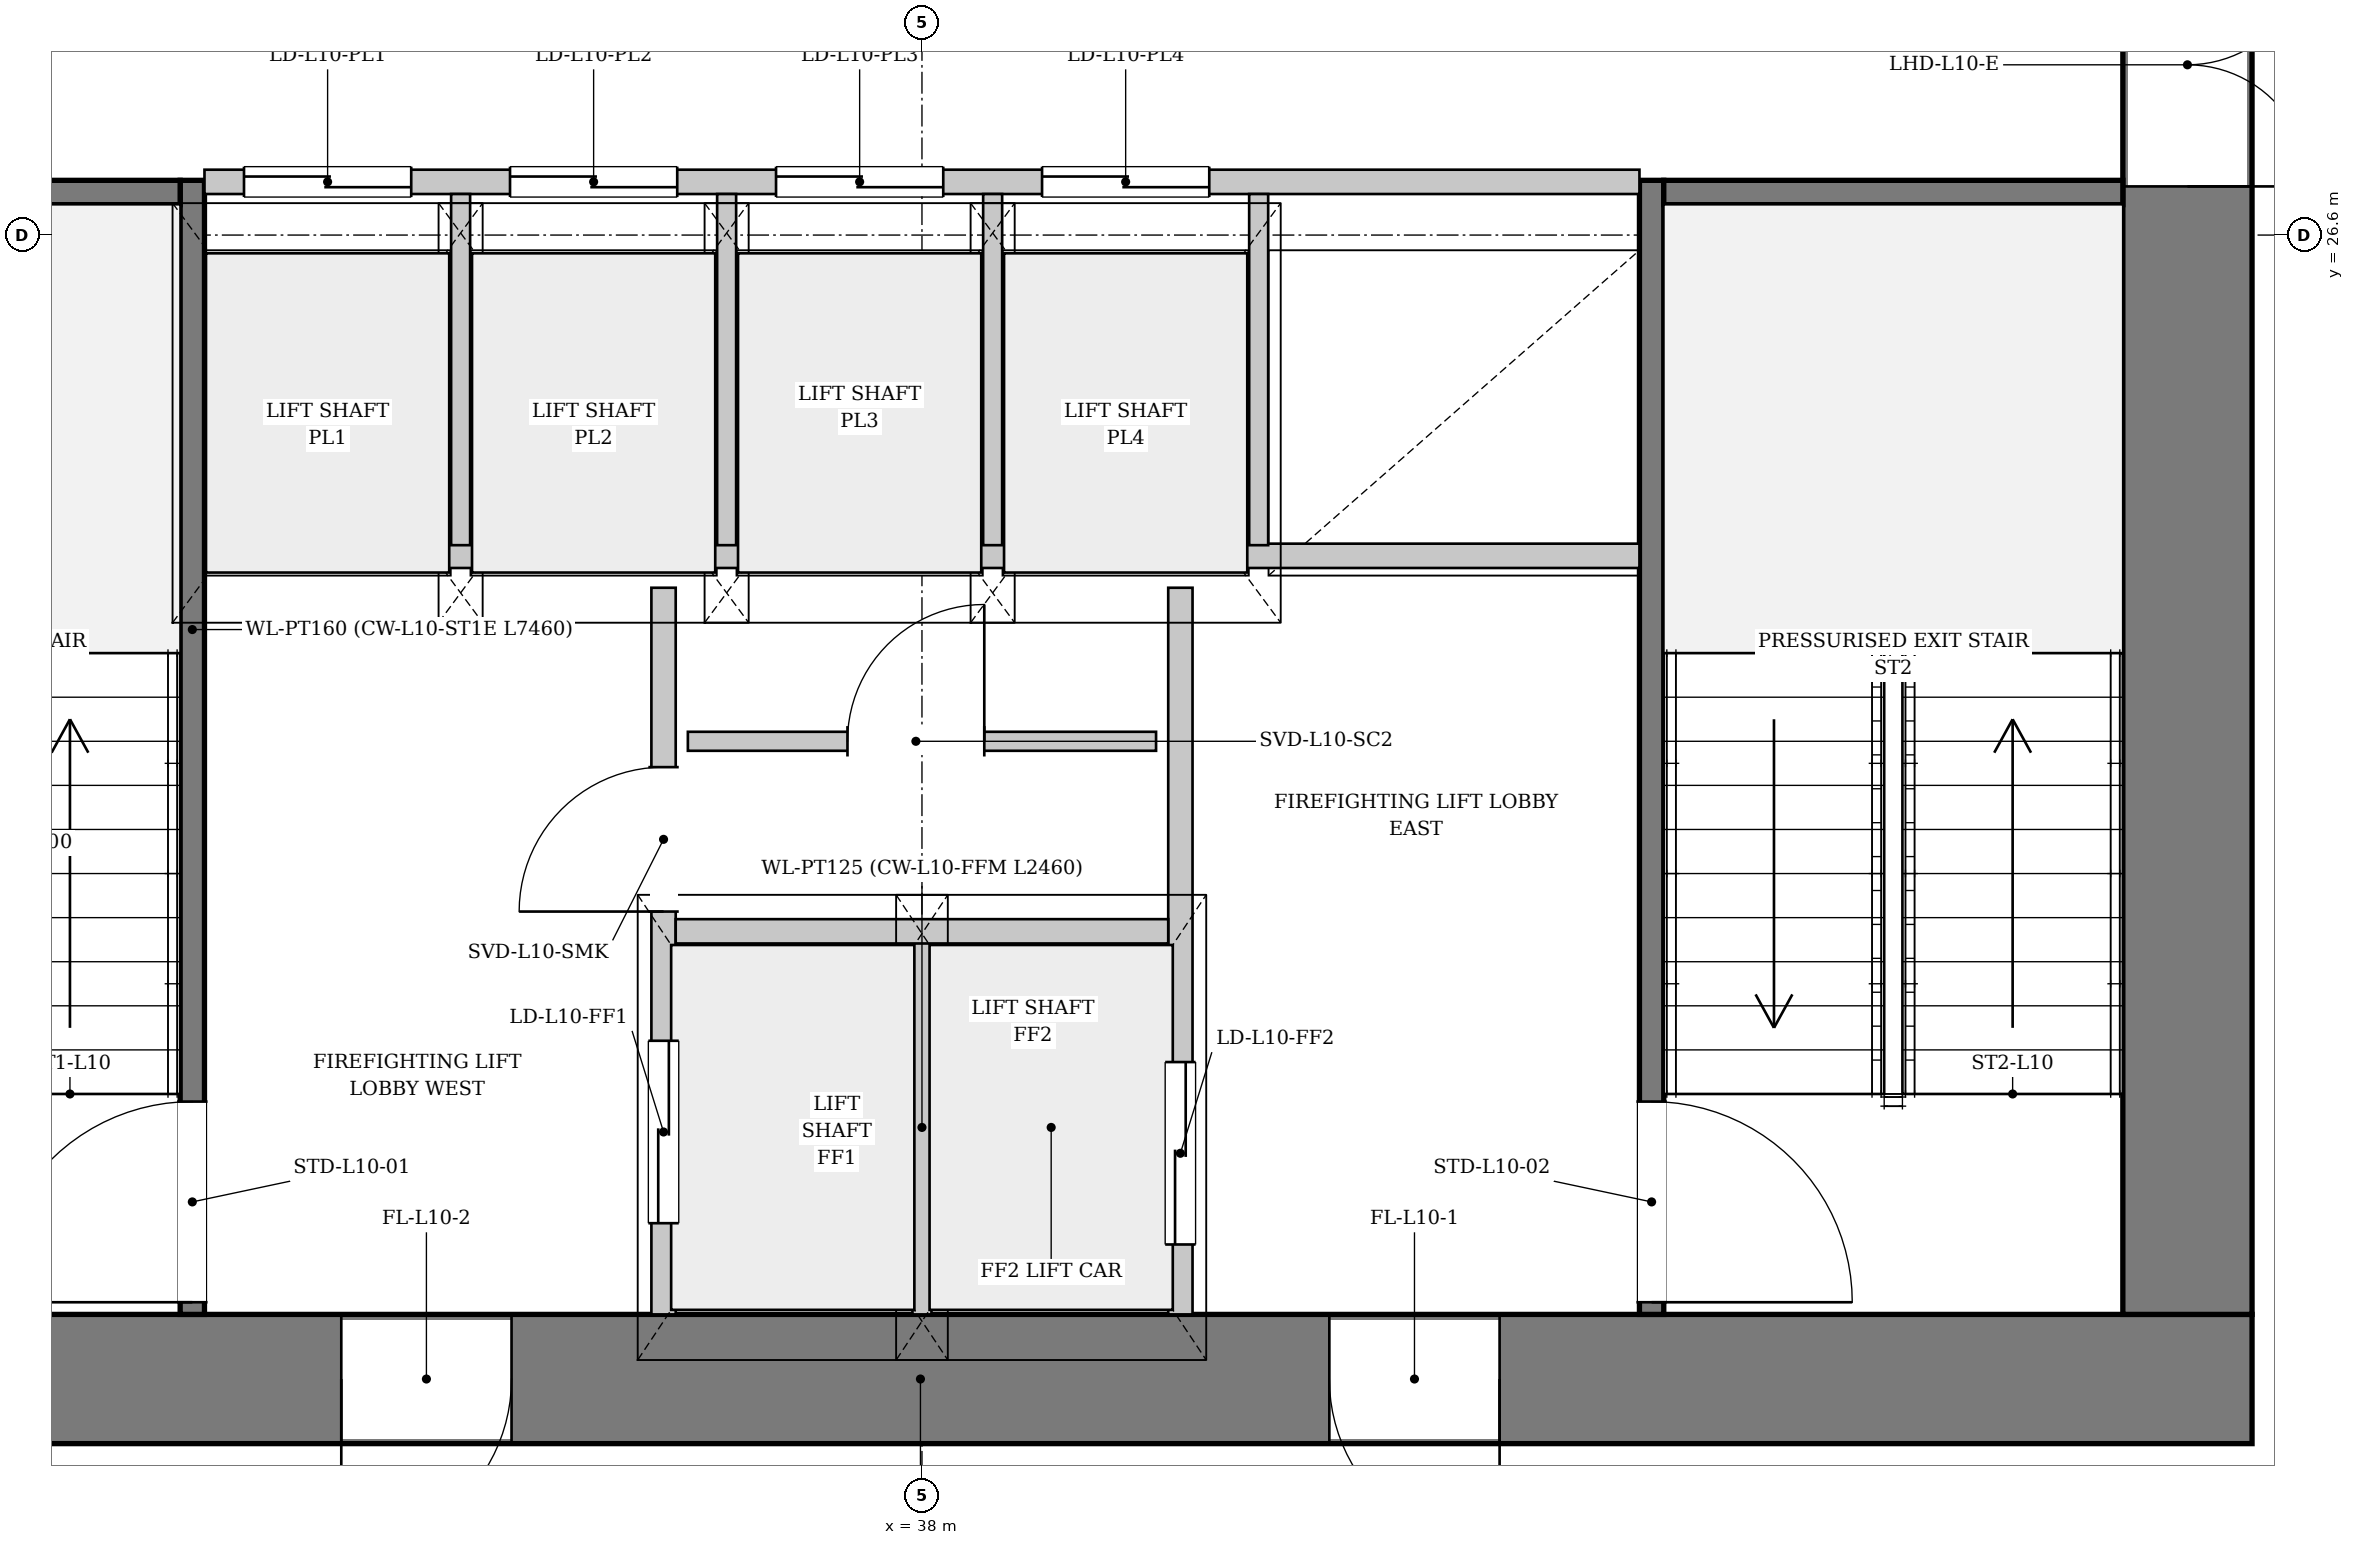
"""IFC4 building model, lengths in metres.
Left out: names, types, materials, properties, quantities, classifications, styles, units other than length and angle.
Written with IfcOpenShell. Run it as: python <this file> out.ifc"""

import sys

from ifc_helpers import new_model, si_unit, direction, frame, frame_2d, origin, place, context, subcontext, project, spatial, rectangle, extrude, source, transform, mapped, element, fill, save


model = new_model("IFC4")
c1 = context("Model", 3, precision=1e-05, world=origin(), true_north=direction((0.0, 1.0)))
c2 = subcontext(c1, "Body", "Model", "MODEL_VIEW")
j1 = project(units=[si_unit("LENGTHUNIT", "METRE"), si_unit("PLANEANGLEUNIT", "RADIAN")], contexts=[c1])
p1 = place(None, origin())
s1 = spatial("IfcSite", under=j1, at=p1, CompositionType="ELEMENT")
p2 = place(p1, origin())
s2 = spatial("IfcBuilding", under=s1, at=p2, CompositionType="ELEMENT")
p3 = place(p2, frame((0.0, 0.0, 43.5)))
s3 = spatial("IfcBuildingStorey", under=s2, at=p3, CompositionType="ELEMENT", Elevation=43.5)
p4 = place(p3, frame((46.75, 19.075, 0.0), z_axis=(0.0, 0.0, 1.0), x_axis=(-1.0, 0.0, 0.0)))
e1 = element("IfcWall", 1, at=p4, inside=s3, PredefinedType="SHEAR", context=c2, shape_type="SweptSolid", body=[
    extrude(rectangle(XDim=17.5, YDim=0.85, at=frame_2d((8.75, 0.0))), origin(), (0.0, 0.0, 1.0), 3.3),
])
p5 = place(p4, frame((4.95, 0.0, 0.0)))
e2 = element("IfcOpeningElement", 2, at=p5, cuts=e1, PredefinedType="OPENING", context=c2, shape_type="SweptSolid", body=[
    extrude(rectangle(XDim=1.12, YDim=2.25, at=frame_2d((0.56, 1.125))), frame((0.0, 0.435, 0.0), z_axis=(0.0, -1.0, 0.0), x_axis=(1.0, 0.0, 0.0)), (0.0, 0.0, 1.0), 0.87),
])
p6 = place(p4, frame((11.45, 0.0, 0.0)))
e3 = element("IfcOpeningElement", 3, at=p6, cuts=e1, PredefinedType="OPENING", context=c2, shape_type="SweptSolid", body=[
    extrude(rectangle(XDim=1.12, YDim=2.25, at=frame_2d((0.56, 1.125))), frame((0.0, 0.435, 0.0), z_axis=(0.0, -1.0, 0.0), x_axis=(1.0, 0.0, 0.0)), (0.0, 0.0, 1.0), 0.87),
])
p7 = place(p3, frame((46.325, 33.7, 0.0), z_axis=(0.0, 0.0, 1.0), x_axis=(0.0, -1.0, 0.0)))
e4 = element("IfcWall", 4, at=p7, inside=s3, PredefinedType="SHEAR", context=c2, shape_type="SweptSolid", body=[
    extrude(rectangle(XDim=14.2, YDim=0.85, at=frame_2d((7.1, 0.0))), origin(), (0.0, 0.0, 1.0), 3.3),
])
p8 = place(p7, frame((5.18, 0.0, 0.0)))
e5 = element("IfcOpeningElement", 5, at=p8, cuts=e4, PredefinedType="OPENING", context=c2, shape_type="SweptSolid", body=[
    extrude(rectangle(XDim=1.6, YDim=2.2, at=frame_2d((0.8, 1.1))), frame((0.0, 0.435, 0.0), z_axis=(0.0, -1.0, 0.0), x_axis=(1.0, 0.0, 0.0)), (0.0, 0.0, 1.0), 0.87),
])
p9 = place(p3, frame((33.2, 19.5, 0.0), z_axis=(0.0, 0.0, 1.0), x_axis=(0.0, 1.0, 0.0)))
e6 = element("IfcWall", 6, at=p9, inside=s3, PredefinedType="PARTITIONING", context=c2, shape_type="SweptSolid", body=[
    extrude(rectangle(XDim=7.46, YDim=0.16, at=frame_2d((3.73, 0.0))), origin(), (0.0, 0.0, 1.0), 3.3),
])
p10 = place(p9, frame((0.08, 0.0, 0.0)))
e7 = element("IfcOpeningElement", 7, at=p10, cuts=e6, PredefinedType="OPENING", context=c2, shape_type="SweptSolid", body=[
    extrude(rectangle(XDim=1.32, YDim=2.2, at=frame_2d((0.66, 1.1))), frame((0.0, 0.09, 0.0), z_axis=(0.0, -1.0, 0.0), x_axis=(1.0, 0.0, 0.0)), (0.0, 0.0, 1.0), 0.18),
])
p11 = place(p3, frame((30.1, 26.88, 0.0), z_axis=(0.0, 0.0, 1.0), x_axis=(1.0, 0.0, 0.0)))
e8 = element("IfcWall", 8, at=p11, inside=s3, PredefinedType="PARTITIONING", context=c2, shape_type="SweptSolid", body=[
    extrude(rectangle(XDim=3.02, YDim=0.16, at=frame_2d((1.51, 0.0))), origin(), (0.0, 0.0, 1.0), 3.3),
])
p12 = place(p3, frame((42.8, 26.96, 0.0), z_axis=(0.0, 0.0, 1.0), x_axis=(0.0, -1.0, 0.0)))
e9 = element("IfcWall", 9, at=p12, inside=s3, PredefinedType="PARTITIONING", context=c2, shape_type="SweptSolid", body=[
    extrude(rectangle(XDim=7.46, YDim=0.16, at=frame_2d((3.73, 0.0))), origin(), (0.0, 0.0, 1.0), 3.3),
])
p13 = place(p12, frame((6.06, 0.0, 0.0)))
e10 = element("IfcOpeningElement", 10, at=p13, cuts=e9, PredefinedType="OPENING", context=c2, shape_type="SweptSolid", body=[
    extrude(rectangle(XDim=1.32, YDim=2.2, at=frame_2d((0.66, 1.1))), frame((0.0, 0.09, 0.0), z_axis=(0.0, -1.0, 0.0), x_axis=(1.0, 0.0, 0.0)), (0.0, 0.0, 1.0), 0.18),
])
p14 = place(p3, frame((42.88, 26.88, 0.0), z_axis=(0.0, 0.0, 1.0), x_axis=(1.0, 0.0, 0.0)))
e11 = element("IfcWall", 11, at=p14, inside=s3, PredefinedType="PARTITIONING", context=c2, shape_type="SweptSolid", body=[
    extrude(rectangle(XDim=3.02, YDim=0.16, at=frame_2d((1.51, 0.0))), origin(), (0.0, 0.0, 1.0), 3.3),
])
p15 = place(p3, frame((36.3, 19.5, 0.0), z_axis=(0.0, 0.0, 1.0), x_axis=(0.0, 1.0, 0.0)))
e12 = element("IfcWall", 12, at=p15, inside=s3, PredefinedType="PARTITIONING", context=c2, shape_type="SweptSolid", body=[
    extrude(rectangle(XDim=4.78, YDim=0.16, at=frame_2d((2.39, 0.0))), origin(), (0.0, 0.0, 1.0), 3.3),
])
p16 = place(p15, frame((0.6, 0.0, 0.0)))
e13 = element("IfcOpeningElement", 13, at=p16, cuts=e12, PredefinedType="OPENING", context=c2, shape_type="SweptSolid", body=[
    extrude(rectangle(XDim=1.2, YDim=2.2, at=frame_2d((0.6, 1.1))), frame((0.0, 0.09, 0.0), z_axis=(0.0, -1.0, 0.0), x_axis=(1.0, 0.0, 0.0)), (0.0, 0.0, 1.0), 0.18),
])
p17 = place(p15, frame((2.65, 0.0, 0.0)))
e14 = element("IfcOpeningElement", 14, at=p17, cuts=e12, PredefinedType="OPENING", context=c2, shape_type="SweptSolid", body=[
    extrude(rectangle(XDim=0.95, YDim=2.1, at=frame_2d((0.475, 1.05))), frame((0.0, 0.09, 0.0), z_axis=(0.0, -1.0, 0.0), x_axis=(1.0, 0.0, 0.0)), (0.0, 0.0, 1.0), 0.18),
])
p18 = place(p3, frame((39.7, 24.28, 0.0), z_axis=(0.0, 0.0, 1.0), x_axis=(0.0, -1.0, 0.0)))
e15 = element("IfcWall", 15, at=p18, inside=s3, PredefinedType="PARTITIONING", context=c2, shape_type="SweptSolid", body=[
    extrude(rectangle(XDim=4.78, YDim=0.16, at=frame_2d((2.39, 0.0))), origin(), (0.0, 0.0, 1.0), 3.3),
])
p19 = place(p18, frame((3.12, 0.0, 0.0)))
e16 = element("IfcOpeningElement", 16, at=p19, cuts=e15, PredefinedType="OPENING", context=c2, shape_type="SweptSolid", body=[
    extrude(rectangle(XDim=1.2, YDim=2.2, at=frame_2d((0.6, 1.1))), frame((0.0, 0.09, 0.0), z_axis=(0.0, -1.0, 0.0), x_axis=(1.0, 0.0, 0.0)), (0.0, 0.0, 1.0), 0.18),
])
p20 = place(p3, frame((38.0, 19.5, 0.0), z_axis=(0.0, 0.0, 1.0), x_axis=(0.0, 1.0, 0.0)))
e17 = element("IfcWall", 17, at=p20, inside=s3, PredefinedType="PARTITIONING", context=c2, shape_type="SweptSolid", body=[
    extrude(rectangle(XDim=2.46, YDim=0.125, at=frame_2d((1.23, 0.0))), origin(), (0.0, 0.0, 1.0), 3.3),
])
p21 = place(p3, frame((36.38, 22.02, 0.0), z_axis=(0.0, 0.0, 1.0), x_axis=(1.0, 0.0, 0.0)))
e18 = element("IfcWall", 18, at=p21, inside=s3, PredefinedType="PARTITIONING", context=c2, shape_type="SweptSolid", body=[
    extrude(rectangle(XDim=3.24, YDim=0.16, at=frame_2d((1.62, 0.0))), origin(), (0.0, 0.0, 1.0), 3.3),
])
p22 = place(p3, frame((33.28, 24.49, 0.0), z_axis=(0.0, 0.0, 1.0), x_axis=(1.0, 0.0, 0.0)))
e19 = element("IfcWall", 19, at=p22, inside=s3, PredefinedType="PARTITIONING", context=c2, shape_type="SweptSolid", body=[
    extrude(rectangle(XDim=9.44, YDim=0.16, at=frame_2d((4.72, 0.0))), origin(), (0.0, 0.0, 1.0), 3.3),
])
p23 = place(p3, frame((36.46, 23.27, 0.0), z_axis=(0.0, 0.0, 1.0), x_axis=(1.0, 0.0, 0.0)))
e20 = element("IfcWall", 20, at=p23, inside=s3, PredefinedType="PARTITIONING", context=c2, shape_type="SweptSolid", body=[
    extrude(rectangle(XDim=3.08, YDim=0.125, at=frame_2d((1.54, 0.0))), origin(), (0.0, 0.0, 1.0), 3.3),
])
p24 = place(p23, frame((1.05, 0.0, 0.0)))
e21 = element("IfcOpeningElement", 21, at=p24, cuts=e20, PredefinedType="OPENING", context=c2, shape_type="SweptSolid", body=[
    extrude(rectangle(XDim=0.9, YDim=2.1, at=frame_2d((0.45, 1.05))), frame((0.0, 0.073, 0.0), z_axis=(0.0, -1.0, 0.0), x_axis=(1.0, 0.0, 0.0)), (0.0, 0.0, 1.0), 0.145),
])
p25 = place(p3, frame((33.28, 26.95, 0.0), z_axis=(0.0, 0.0, 1.0), x_axis=(1.0, 0.0, 0.0)))
e22 = element("IfcWall", 22, at=p25, inside=s3, PredefinedType="PARTITIONING", context=c2, shape_type="SweptSolid", body=[
    extrude(rectangle(XDim=9.44, YDim=0.16, at=frame_2d((4.72, 0.0))), origin(), (0.0, 0.0, 1.0), 3.3),
])
p26 = place(p25, frame((0.26, 0.0, 0.0)))
e23 = element("IfcOpeningElement", 23, at=p26, cuts=e22, PredefinedType="OPENING", context=c2, shape_type="SweptSolid", body=[
    extrude(rectangle(XDim=1.1, YDim=2.2, at=frame_2d((0.55, 1.1))), frame((0.0, 0.09, 0.0), z_axis=(0.0, -1.0, 0.0), x_axis=(1.0, 0.0, 0.0)), (0.0, 0.0, 1.0), 0.18),
])
p27 = place(p25, frame((2.01, 0.0, 0.0)))
e24 = element("IfcOpeningElement", 24, at=p27, cuts=e22, PredefinedType="OPENING", context=c2, shape_type="SweptSolid", body=[
    extrude(rectangle(XDim=1.1, YDim=2.2, at=frame_2d((0.55, 1.1))), frame((0.0, 0.09, 0.0), z_axis=(0.0, -1.0, 0.0), x_axis=(1.0, 0.0, 0.0)), (0.0, 0.0, 1.0), 0.18),
])
p28 = place(p25, frame((3.76, 0.0, 0.0)))
e25 = element("IfcOpeningElement", 25, at=p28, cuts=e22, PredefinedType="OPENING", context=c2, shape_type="SweptSolid", body=[
    extrude(rectangle(XDim=1.1, YDim=2.2, at=frame_2d((0.55, 1.1))), frame((0.0, 0.09, 0.0), z_axis=(0.0, -1.0, 0.0), x_axis=(1.0, 0.0, 0.0)), (0.0, 0.0, 1.0), 0.18),
])
p29 = place(p25, frame((5.51, 0.0, 0.0)))
e26 = element("IfcOpeningElement", 26, at=p29, cuts=e22, PredefinedType="OPENING", context=c2, shape_type="SweptSolid", body=[
    extrude(rectangle(XDim=1.1, YDim=2.2, at=frame_2d((0.55, 1.1))), frame((0.0, 0.09, 0.0), z_axis=(0.0, -1.0, 0.0), x_axis=(1.0, 0.0, 0.0)), (0.0, 0.0, 1.0), 0.18),
])
for number, where, z_axis, x_axis in (
    (27, (34.965, 24.56, 0.0), (0.0, 0.0, 1.0), (0.0, 1.0, 0.0)),
    (28, (36.715, 24.56, 0.0), (0.0, 0.0, 1.0), (0.0, 1.0, 0.0)),
    (29, (38.465, 24.56, 0.0), (0.0, 0.0, 1.0), (0.0, 1.0, 0.0)),
    (30, (40.215, 24.56, 0.0), (0.0, 0.0, 1.0), (0.0, 1.0, 0.0)),
):
    element("IfcWall", number, at=place(p3, frame(where, z_axis=z_axis, x_axis=x_axis)), inside=s3, PredefinedType="PARTITIONING", context=c2, shape_type="SweptSolid", body=[
        extrude(rectangle(XDim=2.31, YDim=0.125, at=frame_2d((1.155, 0.0))), origin(), (0.0, 0.0, 1.0), 3.3),
    ])
m1 = source(origin(), c2, "Body", "SweptSolid", [
    extrude(rectangle(XDim=1.12, YDim=2.25, at=frame_2d((0.56, 1.125))), frame((0.0, 0.025, 0.0), z_axis=(0.0, -1.0, 0.0), x_axis=(1.0, 0.0, 0.0)), (0.0, 0.0, 1.0), 0.05),
])
p30 = place(p5, origin())
e31 = element("IfcDoor", 31, at=p30, inside=s3, OperationType="SINGLE_SWING_LEFT", PredefinedType="DOOR", context=c2, shape_type="MappedRepresentation", body=[
    mapped(m1, transform((0.0, 0.0, 0.0), x_axis=(1.0, 0.0, 0.0), y_axis=(0.0, 1.0, 0.0), z_axis=(0.0, 0.0, 1.0), scale=1.0)),
])
fill(e2, e31)
p31 = place(p6, origin())
e32 = element("IfcDoor", 32, at=p31, inside=s3, OperationType="SINGLE_SWING_RIGHT", PredefinedType="DOOR", context=c2, shape_type="MappedRepresentation", body=[
    mapped(m1, transform((0.0, 0.0, 0.0), x_axis=(1.0, 0.0, 0.0), y_axis=(0.0, 1.0, 0.0), z_axis=(0.0, 0.0, 1.0), scale=1.0)),
])
fill(e3, e32)
m2 = source(origin(), c2, "Body", "SweptSolid", [
    extrude(rectangle(XDim=1.6, YDim=2.2, at=frame_2d((0.8, 1.1))), frame((0.0, 0.025, 0.0), z_axis=(0.0, -1.0, 0.0), x_axis=(1.0, 0.0, 0.0)), (0.0, 0.0, 1.0), 0.05),
])
p32 = place(p8, origin())
e33 = element("IfcDoor", 33, at=p32, inside=s3, OperationType="DOUBLE_DOOR_SINGLE_SWING", PredefinedType="DOOR", context=c2, shape_type="MappedRepresentation", body=[
    mapped(m2, transform((0.0, 0.0, 0.0), x_axis=(1.0, 0.0, 0.0), y_axis=(0.0, 1.0, 0.0), z_axis=(0.0, 0.0, 1.0), scale=1.0)),
])
fill(e5, e33)
m3 = source(origin(), c2, "Body", "SweptSolid", [
    extrude(rectangle(XDim=1.32, YDim=2.2, at=frame_2d((0.66, 1.1))), frame((0.0, 0.025, 0.0), z_axis=(0.0, -1.0, 0.0), x_axis=(1.0, 0.0, 0.0)), (0.0, 0.0, 1.0), 0.05),
])
p33 = place(p10, origin())
e34 = element("IfcDoor", 34, at=p33, inside=s3, OperationType="SINGLE_SWING_LEFT", PredefinedType="DOOR", context=c2, shape_type="MappedRepresentation", body=[
    mapped(m3, transform((0.0, 0.0, 0.0), x_axis=(1.0, 0.0, 0.0), y_axis=(0.0, 1.0, 0.0), z_axis=(0.0, 0.0, 1.0), scale=1.0)),
])
fill(e7, e34)
p34 = place(p13, origin())
e35 = element("IfcDoor", 35, at=p34, inside=s3, OperationType="SINGLE_SWING_RIGHT", PredefinedType="DOOR", context=c2, shape_type="MappedRepresentation", body=[
    mapped(m3, transform((0.0, 0.0, 0.0), x_axis=(1.0, 0.0, 0.0), y_axis=(0.0, 1.0, 0.0), z_axis=(0.0, 0.0, 1.0), scale=1.0)),
])
fill(e10, e35)
m4 = source(origin(), c2, "Body", "SweptSolid", [
    extrude(rectangle(XDim=1.2, YDim=2.2, at=frame_2d((0.6, 1.1))), frame((0.0, 0.025, 0.0), z_axis=(0.0, -1.0, 0.0), x_axis=(1.0, 0.0, 0.0)), (0.0, 0.0, 1.0), 0.05),
])
p35 = place(p16, origin())
e36 = element("IfcDoor", 36, at=p35, inside=s3, OperationType="DOUBLE_DOOR_SLIDING", PredefinedType="DOOR", context=c2, shape_type="MappedRepresentation", body=[
    mapped(m4, transform((0.0, 0.0, 0.0), x_axis=(1.0, 0.0, 0.0), y_axis=(0.0, 1.0, 0.0), z_axis=(0.0, 0.0, 1.0), scale=1.0)),
])
fill(e13, e36)
m5 = source(origin(), c2, "Body", "SweptSolid", [
    extrude(rectangle(XDim=0.95, YDim=2.1, at=frame_2d((0.475, 1.05))), frame((0.0, 0.025, 0.0), z_axis=(0.0, -1.0, 0.0), x_axis=(1.0, 0.0, 0.0)), (0.0, 0.0, 1.0), 0.05),
])
p36 = place(p17, origin())
e37 = element("IfcDoor", 37, at=p36, inside=s3, OperationType="SINGLE_SWING_LEFT", PredefinedType="DOOR", context=c2, shape_type="MappedRepresentation", body=[
    mapped(m5, transform((0.0, 0.0, 0.0), x_axis=(1.0, 0.0, 0.0), y_axis=(0.0, 1.0, 0.0), z_axis=(0.0, 0.0, 1.0), scale=1.0)),
])
fill(e14, e37)
m6 = source(origin(), c2, "Body", "SweptSolid", [
    extrude(rectangle(XDim=0.9, YDim=2.1, at=frame_2d((0.45, 1.05))), frame((0.0, 0.025, 0.0), z_axis=(0.0, -1.0, 0.0), x_axis=(1.0, 0.0, 0.0)), (0.0, 0.0, 1.0), 0.05),
])
p37 = place(p24, origin())
e38 = element("IfcDoor", 38, at=p37, inside=s3, OperationType="SINGLE_SWING_RIGHT", PredefinedType="DOOR", context=c2, shape_type="MappedRepresentation", body=[
    mapped(m6, transform((0.0, 0.0, 0.0), x_axis=(1.0, 0.0, 0.0), y_axis=(0.0, 1.0, 0.0), z_axis=(0.0, 0.0, 1.0), scale=1.0)),
])
fill(e21, e38)
p38 = place(p19, origin())
e39 = element("IfcDoor", 39, at=p38, inside=s3, OperationType="DOUBLE_DOOR_SLIDING", PredefinedType="DOOR", context=c2, shape_type="MappedRepresentation", body=[
    mapped(m4, transform((0.0, 0.0, 0.0), x_axis=(1.0, 0.0, 0.0), y_axis=(0.0, 1.0, 0.0), z_axis=(0.0, 0.0, 1.0), scale=1.0)),
])
fill(e16, e39)
m7 = source(origin(), c2, "Body", "SweptSolid", [
    extrude(rectangle(XDim=1.1, YDim=2.2, at=frame_2d((0.55, 1.1))), frame((0.0, 0.025, 0.0), z_axis=(0.0, -1.0, 0.0), x_axis=(1.0, 0.0, 0.0)), (0.0, 0.0, 1.0), 0.05),
])
p39 = place(p26, origin())
e40 = element("IfcDoor", 40, at=p39, inside=s3, OperationType="DOUBLE_DOOR_SLIDING", PredefinedType="DOOR", context=c2, shape_type="MappedRepresentation", body=[
    mapped(m7, transform((0.0, 0.0, 0.0), x_axis=(1.0, 0.0, 0.0), y_axis=(0.0, 1.0, 0.0), z_axis=(0.0, 0.0, 1.0), scale=1.0)),
])
fill(e23, e40)
p40 = place(p27, origin())
e41 = element("IfcDoor", 41, at=p40, inside=s3, OperationType="DOUBLE_DOOR_SLIDING", PredefinedType="DOOR", context=c2, shape_type="MappedRepresentation", body=[
    mapped(m7, transform((0.0, 0.0, 0.0), x_axis=(1.0, 0.0, 0.0), y_axis=(0.0, 1.0, 0.0), z_axis=(0.0, 0.0, 1.0), scale=1.0)),
])
fill(e24, e41)
p41 = place(p28, origin())
e42 = element("IfcDoor", 42, at=p41, inside=s3, OperationType="DOUBLE_DOOR_SLIDING", PredefinedType="DOOR", context=c2, shape_type="MappedRepresentation", body=[
    mapped(m7, transform((0.0, 0.0, 0.0), x_axis=(1.0, 0.0, 0.0), y_axis=(0.0, 1.0, 0.0), z_axis=(0.0, 0.0, 1.0), scale=1.0)),
])
fill(e25, e42)
p42 = place(p29, origin())
e43 = element("IfcDoor", 43, at=p42, inside=s3, OperationType="DOUBLE_DOOR_SLIDING", PredefinedType="DOOR", context=c2, shape_type="MappedRepresentation", body=[
    mapped(m7, transform((0.0, 0.0, 0.0), x_axis=(1.0, 0.0, 0.0), y_axis=(0.0, 1.0, 0.0), z_axis=(0.0, 0.0, 1.0), scale=1.0)),
])
fill(e26, e43)
save(model, sys.argv[1])
